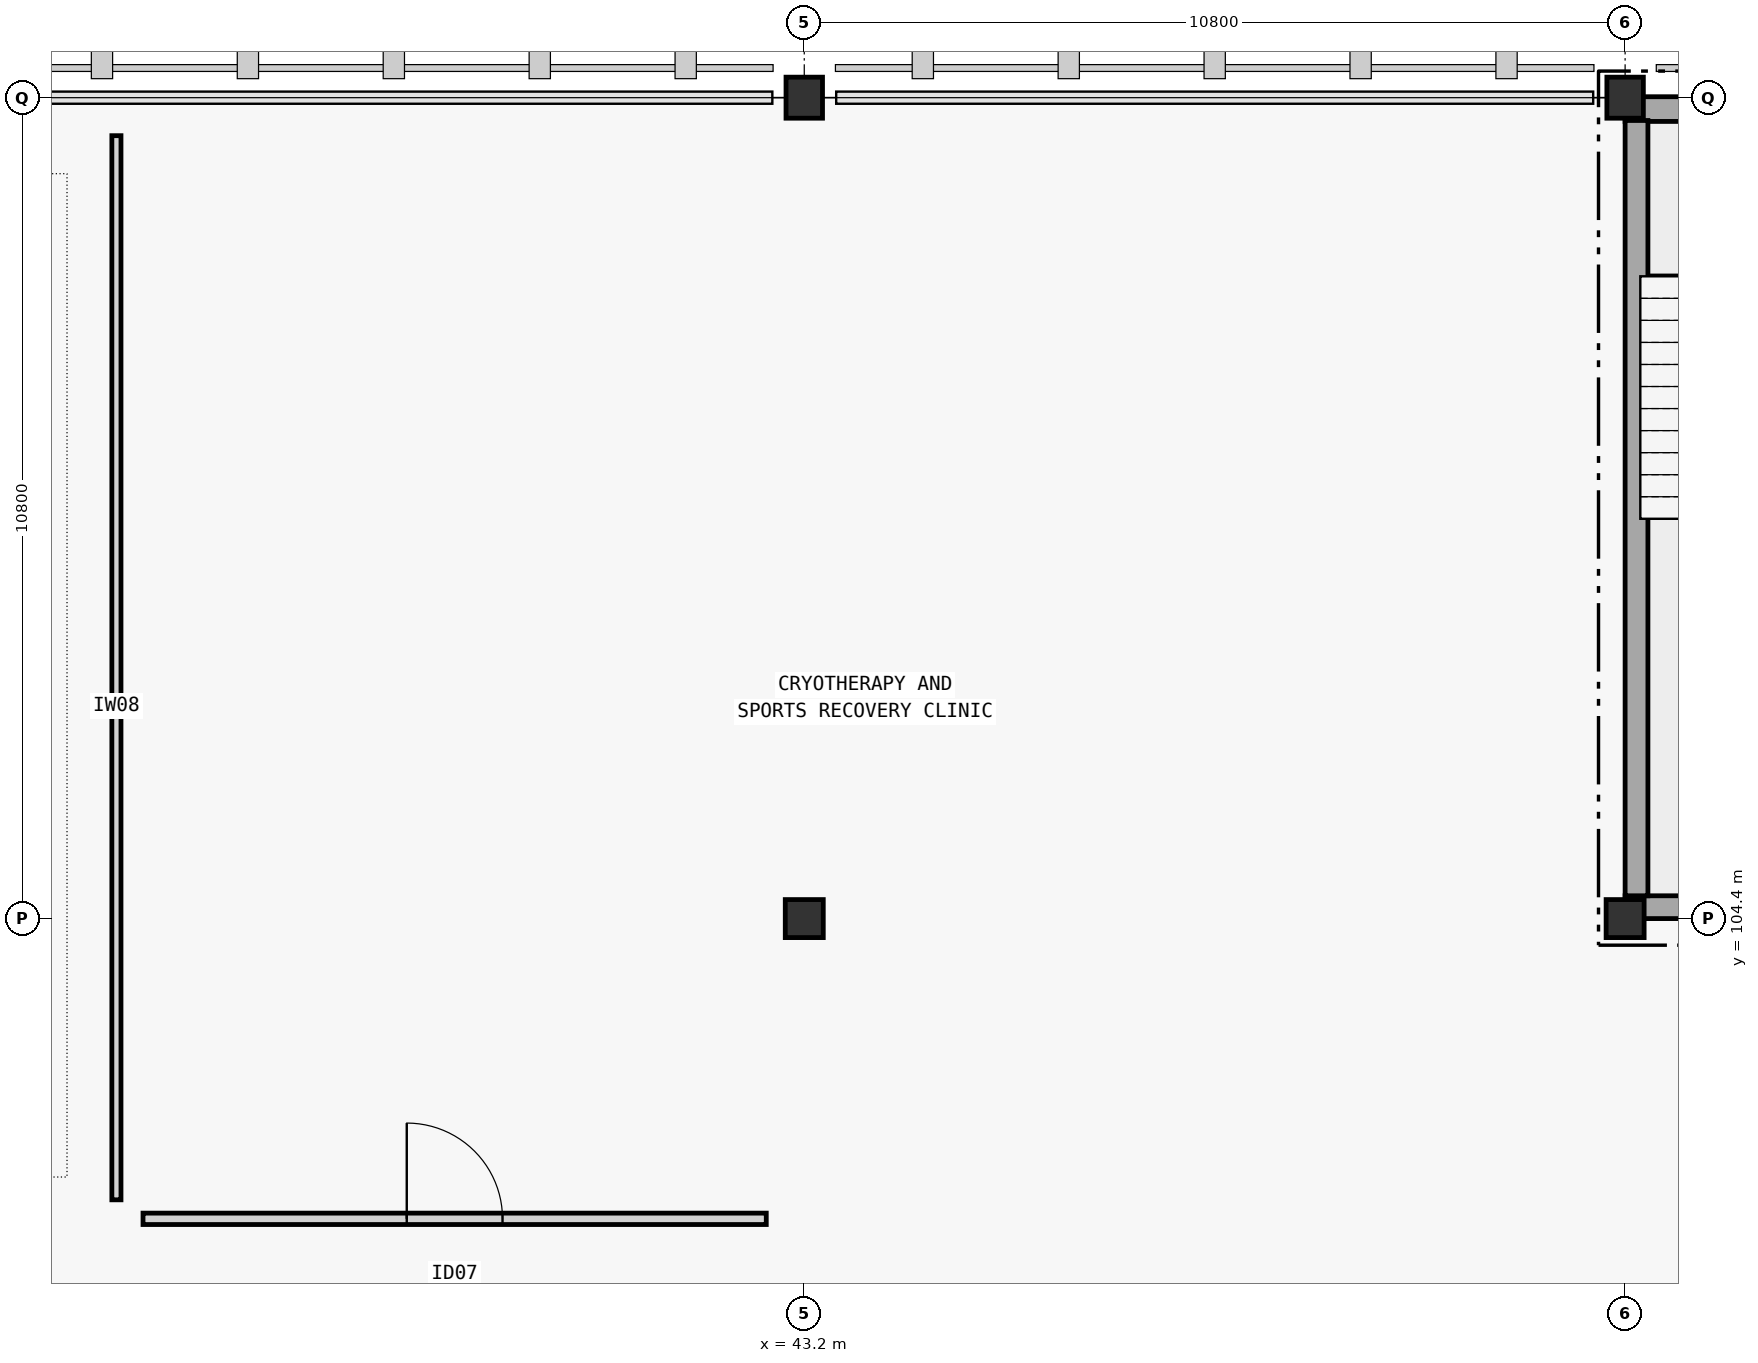
"""IFC4 building model, lengths in metres.
Left out: names, types, materials, properties, quantities, classifications, styles, units other than length and angle.
Written with IfcOpenShell. Run it as: python <this file> out.ifc"""

import sys

from ifc_helpers import new_model, si_unit, direction, frame, frame_2d, origin, origin_2d, place, context, subcontext, project, spatial, rectangle, extrude, element, fill, save


model = new_model("IFC4")
c1 = context("Model", 3, precision=1e-05, world=origin(), true_north=direction((0.0, 1.0)))
c2 = subcontext(c1, "Body", "Model", "MODEL_VIEW")
j1 = project(units=[si_unit("LENGTHUNIT", "METRE"), si_unit("PLANEANGLEUNIT", "RADIAN")], contexts=[c1])
p1 = place(None, origin())
s1 = spatial("IfcSite", under=j1, at=p1, CompositionType="ELEMENT")
p2 = place(p1, origin())
s2 = spatial("IfcBuilding", under=s1, at=p2, CompositionType="ELEMENT")
p3 = place(p2, frame((0.0, 0.0, 15.0)))
s3 = spatial("IfcBuildingStorey", under=s2, at=p3, CompositionType="ELEMENT", Elevation=15.0)
p4 = place(p3, frame((43.2, 104.4, 0.0), z_axis=(0.0, 0.0, 1.0), x_axis=(1.0, 0.0, 0.0)))
e1 = element("IfcColumn", 1, at=p4, inside=s3, PredefinedType="COLUMN", context=c2, shape_type="SweptSolid", body=[
    extrude(rectangle(XDim=0.5, YDim=0.5, at=origin_2d()), origin(), (0.0, 0.0, 1.0), 4.2),
])
p5 = place(p3, frame((43.2, 115.2, 0.0), z_axis=(0.0, 0.0, 1.0), x_axis=(1.0, 0.0, 0.0)))
e2 = element("IfcColumn", 2, at=p5, inside=s3, PredefinedType="COLUMN", context=c2, shape_type="SweptSolid", body=[
    extrude(rectangle(XDim=0.48, YDim=0.54, at=origin_2d()), origin(), (0.0, 0.0, 1.0), 4.2),
])
p6 = place(p3, frame((54.0, 104.4, 0.0), z_axis=(0.0, 0.0, 1.0), x_axis=(1.0, 0.0, 0.0)))
e3 = element("IfcColumn", 3, at=p6, inside=s3, PredefinedType="COLUMN", context=c2, shape_type="SweptSolid", body=[
    extrude(rectangle(XDim=0.5, YDim=0.5, at=origin_2d()), origin(), (0.0, 0.0, 1.0), 4.2),
])
p7 = place(p3, frame((54.0, 115.2, 0.0), z_axis=(0.0, 0.0, 1.0), x_axis=(1.0, 0.0, 0.0)))
e4 = element("IfcColumn", 4, at=p7, inside=s3, PredefinedType="COLUMN", context=c2, shape_type="SweptSolid", body=[
    extrude(rectangle(XDim=0.48, YDim=0.54, at=origin_2d()), origin(), (0.0, 0.0, 1.0), 4.2),
])
p8 = place(p3, frame((64.8, 104.55, 0.0), z_axis=(0.0, 0.0, 1.0), x_axis=(-1.0, 0.0, 0.0)))
e5 = element("IfcWall", 5, at=p8, inside=s3, PredefinedType="SHEAR", context=c2, shape_type="SweptSolid", body=[
    extrude(rectangle(XDim=10.8, YDim=0.3, at=frame_2d((5.4, 0.0))), origin(), (0.0, 0.0, 1.0), 4.2),
])
p9 = place(p3, frame((54.0, 115.05, 0.0), z_axis=(0.0, 0.0, 1.0), x_axis=(1.0, 0.0, 0.0)))
e6 = element("IfcWall", 6, at=p9, inside=s3, PredefinedType="SHEAR", context=c2, shape_type="SweptSolid", body=[
    extrude(rectangle(XDim=10.8, YDim=0.325, at=frame_2d((5.4, 0.0))), origin(), (0.0, 0.0, 1.0), 4.2),
])
p10 = place(p3, frame((54.15, 104.7, 0.0), z_axis=(0.0, 0.0, 1.0), x_axis=(0.0, 1.0, 0.0)))
e7 = element("IfcWall", 7, at=p10, inside=s3, PredefinedType="SHEAR", context=c2, shape_type="SweptSolid", body=[
    extrude(rectangle(XDim=10.2, YDim=0.3, at=frame_2d((5.1, 0.0))), origin(), (0.0, 0.0, 1.0), 4.2),
])
p11 = place(p3, frame((34.5, 100.45, 0.0), z_axis=(0.0, 0.0, 1.0), x_axis=(1.0, 0.0, 0.0)))
e8 = element("IfcWall", 8, at=p11, inside=s3, PredefinedType="STANDARD", context=c2, shape_type="SweptSolid", body=[
    extrude(rectangle(XDim=8.2, YDim=0.15, at=frame_2d((4.1, 0.0))), origin(), (0.0, 0.0, 1.0), 3.06),
])
p12 = place(p11, frame((3.47, 0.0, 0.0)))
e9 = element("IfcOpeningElement", 9, at=p12, cuts=e8, PredefinedType="OPENING", context=c2, shape_type="SweptSolid", body=[
    extrude(rectangle(XDim=1.26, YDim=2.2, at=frame_2d((0.63, 1.1))), frame((0.0, 0.075, 0.0), z_axis=(0.0, -1.0, 0.0), x_axis=(1.0, 0.0, 0.0)), (0.0, 0.0, 1.0), 0.15),
])
p13 = place(p3, frame((34.15, 100.7, 0.0), z_axis=(0.0, 0.0, 1.0), x_axis=(0.0, 1.0, 0.0)))
e10 = element("IfcWall", 10, at=p13, inside=s3, PredefinedType="STANDARD", context=c2, shape_type="SweptSolid", body=[
    extrude(rectangle(XDim=14.0, YDim=0.12, at=frame_2d((7.0, 0.0))), origin(), (0.0, 0.0, 1.0), 3.06),
])
p14 = place(p12, origin())
e11 = element("IfcDoor", 11, at=p14, inside=s3, OperationType="SINGLE_SWING_LEFT", PredefinedType="DOOR", context=c2, shape_type="SweptSolid", body=[
    extrude(rectangle(XDim=1.26, YDim=2.2, at=frame_2d((0.63, 1.1))), frame((0.0, 0.025, 0.0), z_axis=(0.0, -1.0, 0.0), x_axis=(1.0, 0.0, 0.0)), (0.0, 0.0, 1.0), 0.05),
])
fill(e9, e11)
save(model, sys.argv[1])
